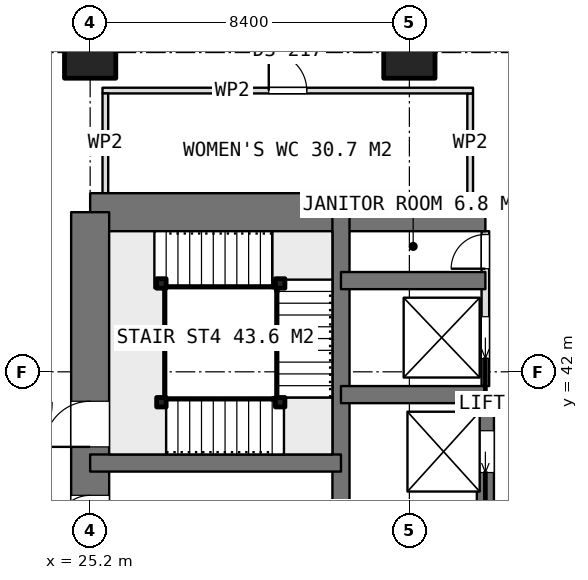
"""IFC4 building model, lengths in metres.
Left out: names, types, materials, properties, quantities, classifications, styles, units other than length and angle.
Written with IfcOpenShell. Run it as: python <this file> out.ifc"""

import sys

from ifc_helpers import new_model, si_unit, direction, frame, frame_2d, origin, origin_2d, place, context, subcontext, project, spatial, rectangle, extrude, element, fill, save


model = new_model("IFC4")
c1 = context("Model", 3, precision=1e-05, world=origin(), true_north=direction((0.0, 1.0)))
c2 = subcontext(c1, "Body", "Model", "MODEL_VIEW")
j1 = project(units=[si_unit("LENGTHUNIT", "METRE"), si_unit("PLANEANGLEUNIT", "RADIAN")], contexts=[c1])
p1 = place(None, origin())
s1 = spatial("IfcSite", under=j1, at=p1, CompositionType="ELEMENT")
p2 = place(p1, origin())
s2 = spatial("IfcBuilding", under=s1, at=p2, CompositionType="ELEMENT")
p3 = place(p2, frame((0.0, 0.0, 202.7)))
s3 = spatial("IfcBuildingStorey", under=s2, at=p3, CompositionType="ELEMENT", Elevation=202.7)
p4 = place(p3, frame((25.2, 46.2, 0.0), z_axis=(0.0, 0.0, 1.0), x_axis=(1.0, 0.0, 0.0)))
e1 = element("IfcWall", 1, at=p4, inside=s3, PredefinedType="SHEAR", context=c2, shape_type="SweptSolid", body=[
    extrude(rectangle(XDim=10.4, YDim=1.0, at=frame_2d((5.2, 0.0))), origin(), (0.0, 0.0, 1.0), 3.75),
])
p5 = place(p3, frame((25.2, 21.0, 0.0), z_axis=(0.0, 0.0, 1.0), x_axis=(0.0, 1.0, 0.0)))
e2 = element("IfcWall", 2, at=p5, inside=s3, PredefinedType="SHEAR", context=c2, shape_type="SweptSolid", body=[
    extrude(rectangle(XDim=25.2, YDim=1.0, at=frame_2d((12.6, 0.0))), origin(), (0.0, 0.0, 1.0), 3.75),
])
p6 = place(p5, frame((7.8, 0.0, 0.0)))
e3 = element("IfcOpeningElement", 3, at=p6, cuts=e2, PredefinedType="OPENING", context=c2, shape_type="SweptSolid", body=[
    extrude(rectangle(XDim=1.2, YDim=2.1, at=frame_2d((0.6, 1.05))), frame((0.0, 0.51, 0.0), z_axis=(0.0, -1.0, 0.0), x_axis=(1.0, 0.0, 0.0)), (0.0, 0.0, 1.0), 1.02),
])
p7 = place(p5, frame((14.25, 0.0, 0.0)))
e4 = element("IfcOpeningElement", 4, at=p7, cuts=e2, PredefinedType="OPENING", context=c2, shape_type="SweptSolid", body=[
    extrude(rectangle(XDim=0.9, YDim=2.1, at=frame_2d((0.45, 1.05))), frame((0.0, 0.51, 0.0), z_axis=(0.0, -1.0, 0.0), x_axis=(1.0, 0.0, 0.0)), (0.0, 0.0, 1.0), 1.02),
])
p8 = place(p5, frame((16.85, 0.0, 0.0)))
e5 = element("IfcOpeningElement", 5, at=p8, cuts=e2, PredefinedType="OPENING", context=c2, shape_type="SweptSolid", body=[
    extrude(rectangle(XDim=0.9, YDim=2.1, at=frame_2d((0.45, 1.05))), frame((0.0, 0.51, 0.0), z_axis=(0.0, -1.0, 0.0), x_axis=(1.0, 0.0, 0.0)), (0.0, 0.0, 1.0), 1.02),
])
p9 = place(p5, frame((19.025, 0.0, 0.0)))
e6 = element("IfcOpeningElement", 6, at=p9, cuts=e2, PredefinedType="OPENING", context=c2, shape_type="SweptSolid", body=[
    extrude(rectangle(XDim=1.2, YDim=2.1, at=frame_2d((0.6, 1.05))), frame((0.0, 0.51, 0.0), z_axis=(0.0, -1.0, 0.0), x_axis=(1.0, 0.0, 0.0)), (0.0, 0.0, 1.0), 1.02),
])
p10 = place(p3, frame((31.8, 21.0, 0.0), z_axis=(0.0, 0.0, 1.0), x_axis=(0.0, 1.0, 0.0)))
e7 = element("IfcWall", 7, at=p10, inside=s3, PredefinedType="SHEAR", context=c2, shape_type="SweptSolid", body=[
    extrude(rectangle(XDim=25.2, YDim=0.45, at=frame_2d((12.6, 0.0))), origin(), (0.0, 0.0, 1.0), 3.75),
])
p11 = place(p3, frame((35.6, 23.4, 0.0), z_axis=(0.0, 0.0, 1.0), x_axis=(0.0, 1.0, 0.0)))
e8 = element("IfcWall", 8, at=p11, inside=s3, PredefinedType="SHEAR", context=c2, shape_type="SweptSolid", body=[
    extrude(rectangle(XDim=18.0, YDim=0.45, at=frame_2d((9.0, 0.0))), origin(), (0.0, 0.0, 1.0), 3.75),
])
p12 = place(p11, frame((0.95, 0.0, 0.0)))
e9 = element("IfcOpeningElement", 9, at=p12, cuts=e8, PredefinedType="OPENING", context=c2, shape_type="SweptSolid", body=[
    extrude(rectangle(XDim=1.1, YDim=2.1, at=frame_2d((0.55, 1.05))), frame((0.0, 0.235, 0.0), z_axis=(0.0, -1.0, 0.0), x_axis=(1.0, 0.0, 0.0)), (0.0, 0.0, 1.0), 0.47),
])
p13 = place(p11, frame((3.95, 0.0, 0.0)))
e10 = element("IfcOpeningElement", 10, at=p13, cuts=e8, PredefinedType="OPENING", context=c2, shape_type="SweptSolid", body=[
    extrude(rectangle(XDim=1.1, YDim=2.1, at=frame_2d((0.55, 1.05))), frame((0.0, 0.235, 0.0), z_axis=(0.0, -1.0, 0.0), x_axis=(1.0, 0.0, 0.0)), (0.0, 0.0, 1.0), 0.47),
])
p14 = place(p11, frame((6.95, 0.0, 0.0)))
e11 = element("IfcOpeningElement", 11, at=p14, cuts=e8, PredefinedType="OPENING", context=c2, shape_type="SweptSolid", body=[
    extrude(rectangle(XDim=1.1, YDim=2.1, at=frame_2d((0.55, 1.05))), frame((0.0, 0.235, 0.0), z_axis=(0.0, -1.0, 0.0), x_axis=(1.0, 0.0, 0.0)), (0.0, 0.0, 1.0), 0.47),
])
p15 = place(p11, frame((9.95, 0.0, 0.0)))
e12 = element("IfcOpeningElement", 12, at=p15, cuts=e8, PredefinedType="OPENING", context=c2, shape_type="SweptSolid", body=[
    extrude(rectangle(XDim=1.1, YDim=2.1, at=frame_2d((0.55, 1.05))), frame((0.0, 0.235, 0.0), z_axis=(0.0, -1.0, 0.0), x_axis=(1.0, 0.0, 0.0)), (0.0, 0.0, 1.0), 0.47),
])
p16 = place(p11, frame((12.95, 0.0, 0.0)))
e13 = element("IfcOpeningElement", 13, at=p16, cuts=e8, PredefinedType="OPENING", context=c2, shape_type="SweptSolid", body=[
    extrude(rectangle(XDim=1.1, YDim=2.1, at=frame_2d((0.55, 1.05))), frame((0.0, 0.235, 0.0), z_axis=(0.0, -1.0, 0.0), x_axis=(1.0, 0.0, 0.0)), (0.0, 0.0, 1.0), 0.47),
])
p17 = place(p11, frame((15.95, 0.0, 0.0)))
e14 = element("IfcOpeningElement", 14, at=p17, cuts=e8, PredefinedType="OPENING", context=c2, shape_type="SweptSolid", body=[
    extrude(rectangle(XDim=1.1, YDim=2.1, at=frame_2d((0.55, 1.05))), frame((0.0, 0.235, 0.0), z_axis=(0.0, -1.0, 0.0), x_axis=(1.0, 0.0, 0.0)), (0.0, 0.0, 1.0), 0.47),
])
for number, where, z_axis, x_axis in (
    (15, (31.8, 41.4, 0.0), (0.0, 0.0, 1.0), (1.0, 0.0, 0.0)),
    (16, (31.8, 44.4, 0.0), (0.0, 0.0, 1.0), (1.0, 0.0, 0.0)),
):
    element("IfcWall", number, at=place(p3, frame(where, z_axis=z_axis, x_axis=x_axis)), inside=s3, PredefinedType="SHEAR", context=c2, shape_type="SweptSolid", body=[
        extrude(rectangle(XDim=3.8, YDim=0.45, at=frame_2d((1.9, 0.0))), origin(), (0.0, 0.0, 1.0), 3.75),
    ])
p18 = place(p3, frame((25.2, 39.6, 0.0), z_axis=(0.0, 0.0, 1.0), x_axis=(1.0, 0.0, 0.0)))
e17 = element("IfcWall", 17, at=p18, inside=s3, PredefinedType="SHEAR", context=c2, shape_type="SweptSolid", body=[
    extrude(rectangle(XDim=6.6, YDim=0.45, at=frame_2d((3.3, 0.0))), origin(), (0.0, 0.0, 1.0), 3.75),
])
for number, where, z_axis, x_axis in (
    (18, (25.2, 50.4, 0.0), (0.0, 0.0, 1.0), (1.0, 0.0, 0.0)),
    (19, (33.6, 50.4, 0.0), (0.0, 0.0, 1.0), (1.0, 0.0, 0.0)),
):
    element("IfcColumn", number, at=place(p3, frame(where, z_axis=z_axis, x_axis=x_axis)), inside=s3, PredefinedType="COLUMN", context=c2, shape_type="SweptSolid", body=[
        extrude(rectangle(XDim=1.35, YDim=1.35, at=origin_2d()), origin(), (0.0, 0.0, 1.0), 3.75),
    ])
p19 = place(p3, frame((35.6, 41.625, 0.0), z_axis=(0.0, 0.0, 1.0), x_axis=(0.0, 1.0, 0.0)))
e20 = element("IfcWall", 20, at=p19, inside=s3, PredefinedType="PARTITIONING", context=c2, shape_type="SweptSolid", body=[
    extrude(rectangle(XDim=4.075, YDim=0.2, at=frame_2d((2.038, 0.0))), origin(), (0.0, 0.0, 1.0), 3.5),
])
p20 = place(p19, frame((3.088, 0.0, 0.0)))
e21 = element("IfcOpeningElement", 21, at=p20, cuts=e20, PredefinedType="OPENING", context=c2, shape_type="SweptSolid", body=[
    extrude(rectangle(XDim=0.9, YDim=2.1, at=frame_2d((0.45, 1.05))), frame((0.0, 0.11, 0.0), z_axis=(0.0, -1.0, 0.0), x_axis=(1.0, 0.0, 0.0)), (0.0, 0.0, 1.0), 0.22),
])
p21 = place(p19, frame((0.725, 0.0, 0.0)))
e22 = element("IfcOpeningElement", 22, at=p21, cuts=e20, PredefinedType="OPENING", context=c2, shape_type="SweptSolid", body=[
    extrude(rectangle(XDim=1.1, YDim=2.1, at=frame_2d((0.55, 1.05))), frame((0.0, 0.11, 0.0), z_axis=(0.0, -1.0, 0.0), x_axis=(1.0, 0.0, 0.0)), (0.0, 0.0, 1.0), 0.22),
])
p22 = place(p3, frame((25.525, 49.4, 0.0), z_axis=(0.0, 0.0, 1.0), x_axis=(1.0, 0.0, 0.0)))
e23 = element("IfcWall", 23, at=p22, inside=s3, PredefinedType="PARTITIONING", context=c2, shape_type="SweptSolid", body=[
    extrude(rectangle(XDim=9.75, YDim=0.15, at=frame_2d((4.875, 0.0))), origin(), (0.0, 0.0, 1.0), 3.5),
])
p23 = place(p22, frame((4.375, 0.0, 0.0)))
e24 = element("IfcOpeningElement", 24, at=p23, cuts=e23, PredefinedType="OPENING", context=c2, shape_type="SweptSolid", body=[
    extrude(rectangle(XDim=1.0, YDim=2.1, at=frame_2d((0.5, 1.05))), frame((0.0, 0.085, 0.0), z_axis=(0.0, -1.0, 0.0), x_axis=(1.0, 0.0, 0.0)), (0.0, 0.0, 1.0), 0.17),
])
for number, where, z_axis, x_axis in (
    (25, (25.6, 46.7, 0.0), (0.0, 0.0, 1.0), (0.0, 1.0, 0.0)),
    (26, (35.2, 46.7, 0.0), (0.0, 0.0, 1.0), (0.0, 1.0, 0.0)),
):
    element("IfcWall", number, at=place(p3, frame(where, z_axis=z_axis, x_axis=x_axis)), inside=s3, PredefinedType="PARTITIONING", context=c2, shape_type="SweptSolid", body=[
        extrude(rectangle(XDim=2.625, YDim=0.15, at=frame_2d((1.312, 0.0))), origin(), (0.0, 0.0, 1.0), 3.5),
    ])
for number, where, z_axis, x_axis in (
    (27, (27.075, 41.2, 0.0), (0.0, 0.0, 1.0), (1.0, 0.0, 0.0)),
    (28, (30.2, 41.2, 0.0), (0.0, 0.0, 1.0), (1.0, 0.0, 0.0)),
    (29, (30.2, 44.325, 0.0), (0.0, 0.0, 1.0), (1.0, 0.0, 0.0)),
    (30, (27.075, 44.325, 0.0), (0.0, 0.0, 1.0), (1.0, 0.0, 0.0)),
):
    element("IfcColumn", number, at=place(p3, frame(where, z_axis=z_axis, x_axis=x_axis)), inside=s3, PredefinedType="COLUMN", context=c2, shape_type="SweptSolid", body=[
        extrude(rectangle(XDim=0.25, YDim=0.25, at=origin_2d()), origin(), (0.0, 0.0, 1.0), 3.75),
    ])
p24 = place(p8, origin())
e31 = element("IfcDoor", 31, at=p24, inside=s3, OperationType="SINGLE_SWING_LEFT", PredefinedType="DOOR", context=c2, shape_type="SweptSolid", body=[
    extrude(rectangle(XDim=0.9, YDim=2.1, at=frame_2d((0.45, 1.05))), frame((0.0, 0.025, 0.0), z_axis=(0.0, -1.0, 0.0), x_axis=(1.0, 0.0, 0.0)), (0.0, 0.0, 1.0), 0.05),
])
fill(e5, e31)
p25 = place(p20, origin())
e32 = element("IfcDoor", 32, at=p25, inside=s3, OperationType="SINGLE_SWING_LEFT", PredefinedType="DOOR", context=c2, shape_type="SweptSolid", body=[
    extrude(rectangle(XDim=0.9, YDim=2.1, at=frame_2d((0.45, 1.05))), frame((0.0, 0.025, 0.0), z_axis=(0.0, -1.0, 0.0), x_axis=(1.0, 0.0, 0.0)), (0.0, 0.0, 1.0), 0.05),
])
fill(e21, e32)
p26 = place(p17, origin())
e33 = element("IfcDoor", 33, at=p26, inside=s3, OperationType="SLIDING_TO_LEFT", PredefinedType="USERDEFINED", context=c2, shape_type="SweptSolid", body=[
    extrude(rectangle(XDim=1.1, YDim=2.1, at=frame_2d((0.55, 1.05))), frame((0.0, 0.025, 0.0), z_axis=(0.0, -1.0, 0.0), x_axis=(1.0, 0.0, 0.0)), (0.0, 0.0, 1.0), 0.05),
])
fill(e14, e33)
p27 = place(p21, origin())
e34 = element("IfcDoor", 34, at=p27, inside=s3, OperationType="SLIDING_TO_LEFT", PredefinedType="USERDEFINED", context=c2, shape_type="SweptSolid", body=[
    extrude(rectangle(XDim=1.1, YDim=2.1, at=frame_2d((0.55, 1.05))), frame((0.0, 0.025, 0.0), z_axis=(0.0, -1.0, 0.0), x_axis=(1.0, 0.0, 0.0)), (0.0, 0.0, 1.0), 0.05),
])
fill(e22, e34)
p28 = place(p23, origin())
e35 = element("IfcDoor", 35, at=p28, inside=s3, OperationType="SINGLE_SWING_LEFT", PredefinedType="DOOR", context=c2, shape_type="SweptSolid", body=[
    extrude(rectangle(XDim=1.0, YDim=2.1, at=frame_2d((0.5, 1.05))), frame((0.0, 0.025, 0.0), z_axis=(0.0, -1.0, 0.0), x_axis=(1.0, 0.0, 0.0)), (0.0, 0.0, 1.0), 0.05),
])
fill(e24, e35)
p29 = place(p9, origin())
e36 = element("IfcDoor", 36, at=p29, inside=s3, OperationType="SINGLE_SWING_RIGHT", PredefinedType="DOOR", context=c2, shape_type="SweptSolid", body=[
    extrude(rectangle(XDim=1.2, YDim=2.1, at=frame_2d((0.6, 1.05))), frame((0.0, 0.025, 0.0), z_axis=(0.0, -1.0, 0.0), x_axis=(1.0, 0.0, 0.0)), (0.0, 0.0, 1.0), 0.05),
])
fill(e6, e36)
save(model, sys.argv[1])
